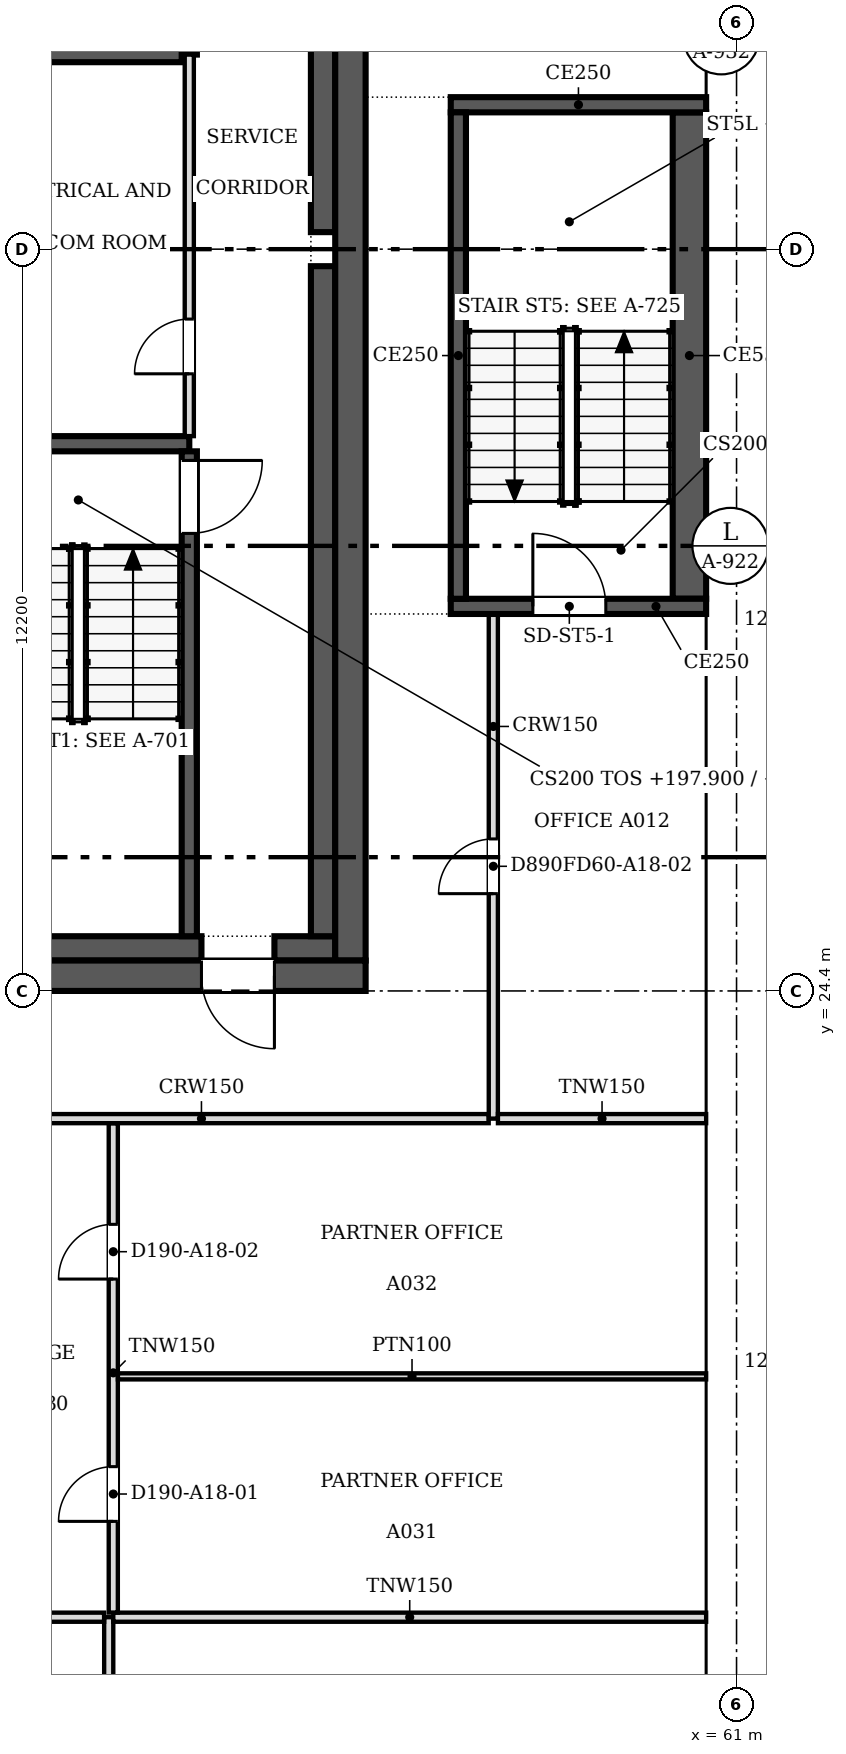
"""IFC4 building model, lengths in metres.
Left out: names, types, materials, properties, quantities, classifications, styles, units other than length and angle.
Written with IfcOpenShell. Run it as: python <this file> out.ifc"""

import sys

from ifc_helpers import new_model, si_unit, direction, frame, frame_2d, origin, place, context, subcontext, project, spatial, polyline, rectangle, outline, extrude, faceted_brep, source, transform, mapped, element, fill, save


model = new_model("IFC4")
c1 = context("Model", 3, precision=1e-05, world=origin(), true_north=direction((0.0, 1.0)))
c2 = subcontext(c1, "Body", "Model", "MODEL_VIEW")
j1 = project(units=[si_unit("LENGTHUNIT", "METRE"), si_unit("PLANEANGLEUNIT", "RADIAN")], contexts=[c1])
p1 = place(None, origin())
s1 = spatial("IfcSite", under=j1, at=p1, CompositionType="ELEMENT")
p2 = place(p1, origin())
s2 = spatial("IfcBuilding", under=s1, at=p2, CompositionType="ELEMENT")
p3 = place(p2, frame((0.0, 0.0, 197.9)))
s3 = spatial("IfcBuildingStorey", under=s2, at=p3, CompositionType="ELEMENT", Elevation=197.9)
m1 = source(origin(), c2, "Body", "SweptSolid", [
    extrude(outline(polyline([(6.1, 0.0), (3.05, 3.8), (0.0, 0.0), (6.1, 0.0)])), frame((0.0, 0.25, 0.0), z_axis=(0.0, -1.0, 0.0), x_axis=(1.0, 0.0, 0.0)), (0.0, 0.0, 1.0), 0.5),
])
p4 = place(p3, frame((60.75, 12.2, 0.0), z_axis=(0.0, 0.0, 1.0), x_axis=(0.0, 1.0, 0.0)))
e1 = element("IfcWall", 1, at=p4, inside=s3, PredefinedType="SOLIDWALL", context=c2, shape_type="MappedRepresentation", body=[
    mapped(m1, transform((0.0, 0.0, 0.0), scale=1.0)),
])
m2 = source(origin(), c2, "Body", "SweptSolid", [
    extrude(outline(polyline([(5.579, 0.25), (3.05, 3.401), (0.521, 0.25), (5.579, 0.25)])), frame((0.0, 0.26, 0.0), z_axis=(0.0, -1.0, 0.0), x_axis=(1.0, 0.0, 0.0)), (0.0, 0.0, 1.0), 0.52),
])
p5 = place(p4, origin())
e2 = element("IfcOpeningElement", 2, at=p5, cuts=e1, PredefinedType="OPENING", context=c2, shape_type="MappedRepresentation", body=[
    mapped(m2, transform((0.0, 0.0, 0.0), scale=1.0)),
])
m3 = source(origin(), c2, "Body", "Brep", [
    faceted_brep([(6.1, -0.25, 0.0), (3.05, -0.25, 3.8), (0.0, -0.25, 0.0), (6.1, -0.25, 0.0), (0.0, 0.25, 0.0), (3.05, 0.25, 3.8), (6.1, 0.25, 0.0), (6.1, 0.25, 0.0)], [[[0, 1, 2, 3]], [[4, 5, 6, 7]], [[6, 5, 1, 0]], [[5, 4, 2, 1]], [[4, 7, 3, 2]], [[3, 7, 6, 0]]]),
])
p6 = place(p3, frame((60.75, 18.3, 0.0), z_axis=(0.0, 0.0, 1.0), x_axis=(0.0, 1.0, 0.0)))
e3 = element("IfcWall", 3, at=p6, inside=s3, PredefinedType="SOLIDWALL", context=c2, shape_type="MappedRepresentation", body=[
    mapped(m3, transform((0.0, 0.0, 0.0), scale=1.0)),
])
p7 = place(p6, origin())
e4 = element("IfcOpeningElement", 4, at=p7, cuts=e3, PredefinedType="OPENING", context=c2, shape_type="MappedRepresentation", body=[
    mapped(m2, transform((0.0, 0.0, 0.0), scale=1.0)),
])
p8 = place(p3, frame((60.75, 24.4, 0.0), z_axis=(0.0, 0.0, 1.0), x_axis=(0.0, 1.0, 0.0)))
e5 = element("IfcWall", 5, at=p8, inside=s3, PredefinedType="SOLIDWALL", context=c2, shape_type="MappedRepresentation", body=[
    mapped(m1, transform((0.0, 0.0, 0.0), scale=1.0)),
])
p9 = place(p8, origin())
e6 = element("IfcOpeningElement", 6, at=p9, cuts=e5, PredefinedType="OPENING", context=c2, shape_type="MappedRepresentation", body=[
    mapped(m2, transform((0.0, 0.0, 0.0), scale=1.0)),
])
p10 = place(p3, frame((60.75, 30.5, 0.0), z_axis=(0.0, 0.0, 1.0), x_axis=(0.0, 1.0, 0.0)))
e7 = element("IfcWall", 7, at=p10, inside=s3, PredefinedType="SOLIDWALL", context=c2, shape_type="MappedRepresentation", body=[
    mapped(m1, transform((0.0, 0.0, 0.0), scale=1.0)),
])
p11 = place(p10, origin())
e8 = element("IfcOpeningElement", 8, at=p11, cuts=e7, PredefinedType="OPENING", context=c2, shape_type="MappedRepresentation", body=[
    mapped(m2, transform((0.0, 0.0, 0.0), scale=1.0)),
])
p12 = place(p3, frame((60.75, 36.6, 0.0), z_axis=(0.0, 0.0, 1.0), x_axis=(0.0, 1.0, 0.0)))
e9 = element("IfcWall", 9, at=p12, inside=s3, PredefinedType="SOLIDWALL", context=c2, shape_type="MappedRepresentation", body=[
    mapped(m3, transform((0.0, 0.0, 0.0), scale=1.0)),
])
p13 = place(p12, origin())
e10 = element("IfcOpeningElement", 10, at=p13, cuts=e9, PredefinedType="OPENING", context=c2, shape_type="MappedRepresentation", body=[
    mapped(m2, transform((0.0, 0.0, 0.0), scale=1.0)),
])
p14 = place(p2, frame((0.0, 0.0, 201.7)))
s4 = spatial("IfcBuildingStorey", under=s2, at=p14, CompositionType="ELEMENT", Elevation=201.7)
m4 = source(origin(), c2, "Body", "SweptSolid", [
    extrude(outline(polyline([(3.05, 0.0), (6.1, 3.8), (3.05, 7.6), (0.0, 3.8), (3.05, 0.0)])), frame((0.0, 0.25, 0.0), z_axis=(0.0, -1.0, 0.0), x_axis=(1.0, 0.0, 0.0)), (0.0, 0.0, 1.0), 0.5),
])
p15 = place(p14, frame((60.75, 9.15, -3.8), z_axis=(0.0, 0.0, 1.0), x_axis=(0.0, 1.0, 0.0)))
e11 = element("IfcWall", 11, at=p15, inside=s4, PredefinedType="SOLIDWALL", context=c2, shape_type="MappedRepresentation", body=[
    mapped(m4, transform((0.0, 0.0, 0.0), scale=1.0)),
])
m5 = source(origin(), c2, "Body", "SweptSolid", [
    extrude(outline(polyline([(3.05, 0.399), (5.78, 3.8), (3.05, 7.201), (0.321, 3.8), (3.05, 0.399)])), frame((0.0, 0.26, 0.0), z_axis=(0.0, -1.0, 0.0), x_axis=(1.0, 0.0, 0.0)), (0.0, 0.0, 1.0), 0.52),
])
p16 = place(p15, origin())
e12 = element("IfcOpeningElement", 12, at=p16, cuts=e11, PredefinedType="OPENING", context=c2, shape_type="MappedRepresentation", body=[
    mapped(m5, transform((0.0, 0.0, 0.0), scale=1.0)),
])
p17 = place(p14, frame((60.75, 15.25, -3.8), z_axis=(0.0, 0.0, 1.0), x_axis=(0.0, 1.0, 0.0)))
e13 = element("IfcWall", 13, at=p17, inside=s4, PredefinedType="SOLIDWALL", context=c2, shape_type="MappedRepresentation", body=[
    mapped(m4, transform((0.0, 0.0, 0.0), scale=1.0)),
])
p18 = place(p17, origin())
e14 = element("IfcOpeningElement", 14, at=p18, cuts=e13, PredefinedType="OPENING", context=c2, shape_type="MappedRepresentation", body=[
    mapped(m5, transform((0.0, 0.0, 0.0), scale=1.0)),
])
m6 = source(origin(), c2, "Body", "Brep", [
    faceted_brep([(3.05, -0.25, 0.0), (6.1, -0.25, 3.8), (6.1, -0.25, 3.8), (3.05, -0.25, 7.6), (0.0, -0.25, 3.8), (0.0, 0.25, 3.8), (3.05, 0.25, 7.6), (6.1, 0.25, 3.8), (6.1, 0.25, 3.8), (3.05, 0.25, 0.0)], [[[0, 1, 2, 3, 4]], [[5, 6, 7, 8, 9]], [[9, 8, 1, 0]], [[7, 6, 3, 2]], [[6, 5, 4, 3]], [[5, 9, 0, 4]], [[1, 8, 7, 2]]]),
])
p19 = place(p14, frame((60.75, 21.35, -3.8), z_axis=(0.0, 0.0, 1.0), x_axis=(0.0, 1.0, 0.0)))
e15 = element("IfcWall", 15, at=p19, inside=s4, PredefinedType="SOLIDWALL", context=c2, shape_type="MappedRepresentation", body=[
    mapped(m6, transform((0.0, 0.0, 0.0), scale=1.0)),
])
p20 = place(p19, origin())
e16 = element("IfcOpeningElement", 16, at=p20, cuts=e15, PredefinedType="OPENING", context=c2, shape_type="MappedRepresentation", body=[
    mapped(m5, transform((0.0, 0.0, 0.0), scale=1.0)),
])
p21 = place(p14, frame((60.75, 27.45, -3.8), z_axis=(0.0, 0.0, 1.0), x_axis=(0.0, 1.0, 0.0)))
e17 = element("IfcWall", 17, at=p21, inside=s4, PredefinedType="SOLIDWALL", context=c2, shape_type="MappedRepresentation", body=[
    mapped(m4, transform((0.0, 0.0, 0.0), scale=1.0)),
])
p22 = place(p21, origin())
e18 = element("IfcOpeningElement", 18, at=p22, cuts=e17, PredefinedType="OPENING", context=c2, shape_type="MappedRepresentation", body=[
    mapped(m5, transform((0.0, 0.0, 0.0), scale=1.0)),
])
p23 = place(p14, frame((60.75, 33.55, -3.8), z_axis=(0.0, 0.0, 1.0), x_axis=(0.0, 1.0, 0.0)))
e19 = element("IfcWall", 19, at=p23, inside=s4, PredefinedType="SOLIDWALL", context=c2, shape_type="MappedRepresentation", body=[
    mapped(m6, transform((0.0, 0.0, 0.0), scale=1.0)),
])
p24 = place(p23, origin())
e20 = element("IfcOpeningElement", 20, at=p24, cuts=e19, PredefinedType="OPENING", context=c2, shape_type="MappedRepresentation", body=[
    mapped(m5, transform((0.0, 0.0, 0.0), scale=1.0)),
])
p25 = place(p14, frame((60.75, 39.65, -3.8), z_axis=(0.0, 0.0, 1.0), x_axis=(0.0, 1.0, 0.0)))
e21 = element("IfcWall", 21, at=p25, inside=s4, PredefinedType="SOLIDWALL", context=c2, shape_type="MappedRepresentation", body=[
    mapped(m4, transform((0.0, 0.0, 0.0), scale=1.0)),
])
p26 = place(p25, origin())
e22 = element("IfcOpeningElement", 22, at=p26, cuts=e21, PredefinedType="OPENING", context=c2, shape_type="MappedRepresentation", body=[
    mapped(m5, transform((0.0, 0.0, 0.0), scale=1.0)),
])
p27 = place(p3, frame((54.9, 24.65, 0.0), z_axis=(0.0, 0.0, 1.0), x_axis=(-1.0, 0.0, 0.0)))
e23 = element("IfcWall", 23, at=p27, inside=s3, PredefinedType="SHEAR", context=c2, shape_type="SweptSolid", body=[
    extrude(rectangle(XDim=24.4, YDim=0.5, at=frame_2d((12.2, 0.0))), origin(), (0.0, 0.0, 1.0), 3.8),
])
m7 = source(origin(), c2, "Body", "SweptSolid", [
    extrude(rectangle(XDim=1.2, YDim=2.1, at=frame_2d((0.6, 1.05))), frame((0.0, 0.26, 0.0), z_axis=(0.0, -1.0, 0.0), x_axis=(1.0, 0.0, 0.0)), (0.0, 0.0, 1.0), 0.52),
])
p28 = place(p27, frame((1.5, 0.0, 0.0)))
e24 = element("IfcOpeningElement", 24, at=p28, cuts=e23, PredefinedType="OPENING", context=c2, shape_type="MappedRepresentation", body=[
    mapped(m7, transform((0.0, 0.0, 0.0), scale=1.0)),
])
p29 = place(p3, frame((54.65, 48.3, 0.0), z_axis=(0.0, 0.0, 1.0), x_axis=(0.0, -1.0, 0.0)))
e25 = element("IfcWall", 25, at=p29, inside=s3, PredefinedType="SHEAR", context=c2, shape_type="SweptSolid", body=[
    extrude(rectangle(XDim=23.4, YDim=0.5, at=frame_2d((11.7, 0.0))), origin(), (0.0, 0.0, 1.0), 3.8),
])
p30 = place(p29, frame((5.0, 0.0, 0.0)))
e26 = element("IfcOpeningElement", 26, at=p30, cuts=e25, PredefinedType="OPENING", context=c2, shape_type="MappedRepresentation", body=[
    mapped(m7, transform((0.0, 0.0, 0.0), scale=1.0)),
])
p31 = place(p3, frame((31.0, 25.1, 0.0), z_axis=(0.0, 0.0, 1.0), x_axis=(1.0, 0.0, 0.0)))
e27 = element("IfcWall", 27, at=p31, inside=s3, PredefinedType="SOLIDWALL", context=c2, shape_type="SweptSolid", body=[
    extrude(rectangle(XDim=21.2, YDim=0.4, at=frame_2d((10.6, 0.0))), origin(), (0.0, 0.0, 1.0), 3.8),
])
p32 = place(p3, frame((53.4, 25.1, 0.0), z_axis=(0.0, 0.0, 1.0), x_axis=(1.0, 0.0, 0.0)))
e28 = element("IfcWall", 28, at=p32, inside=s3, PredefinedType="SOLIDWALL", context=c2, shape_type="SweptSolid", body=[
    extrude(rectangle(XDim=1.0, YDim=0.4, at=frame_2d((0.5, 0.0))), origin(), (0.0, 0.0, 1.0), 3.8),
])
p33 = place(p3, frame((54.2, 25.3, 0.0), z_axis=(0.0, 0.0, 1.0), x_axis=(0.0, 1.0, 0.0)))
e29 = element("IfcWall", 29, at=p33, inside=s3, PredefinedType="SOLIDWALL", context=c2, shape_type="SweptSolid", body=[
    extrude(rectangle(XDim=11.02, YDim=0.4, at=frame_2d((5.51, 0.0))), origin(), (0.0, 0.0, 1.0), 3.8),
])
p34 = place(p3, frame((54.2, 36.88, 0.0), z_axis=(0.0, 0.0, 1.0), x_axis=(0.0, 1.0, 0.0)))
e30 = element("IfcWall", 30, at=p34, inside=s3, PredefinedType="SOLIDWALL", context=c2, shape_type="SweptSolid", body=[
    extrude(rectangle(XDim=5.22, YDim=0.4, at=frame_2d((2.61, 0.0))), origin(), (0.0, 0.0, 1.0), 3.8),
])
p35 = place(p3, frame((48.475, 33.4, 0.0), z_axis=(0.0, 0.0, 1.0), x_axis=(1.0, 0.0, 0.0)))
e31 = element("IfcWall", 31, at=p35, inside=s3, PredefinedType="SOLIDWALL", context=c2, shape_type="SweptSolid", body=[
    extrude(rectangle(XDim=3.525, YDim=0.25, at=frame_2d((1.762, 0.0))), origin(), (0.0, 0.0, 1.0), 3.8),
])
p36 = place(p3, frame((52.0, 25.3, 0.0), z_axis=(0.0, 0.0, 1.0), x_axis=(0.0, 1.0, 0.0)))
e32 = element("IfcWall", 32, at=p36, inside=s3, PredefinedType="SOLIDWALL", context=c2, shape_type="SweptSolid", body=[
    extrude(rectangle(XDim=7.975, YDim=0.25, at=frame_2d((3.987, 0.0))), origin(), (0.0, 0.0, 1.0), 3.8),
])
m8 = source(origin(), c2, "Body", "SweptSolid", [
    extrude(rectangle(XDim=1.2, YDim=2.1, at=frame_2d((0.6, 1.05))), frame((0.0, 0.135, 0.0), z_axis=(0.0, -1.0, 0.0), x_axis=(1.0, 0.0, 0.0)), (0.0, 0.0, 1.0), 0.27),
])
p37 = place(p36, frame((6.625, 0.0, 0.0)))
e33 = element("IfcOpeningElement", 33, at=p37, cuts=e32, PredefinedType="OPENING", context=c2, shape_type="MappedRepresentation", body=[
    mapped(m8, transform((0.0, 0.0, 0.0), scale=1.0)),
])
p38 = place(p3, frame((52.0, 39.8, 0.0), z_axis=(0.0, 0.0, 1.0), x_axis=(0.0, 1.0, 0.0)))
e34 = element("IfcWall", 34, at=p38, inside=s3, PredefinedType="SOLIDWALL", context=c2, shape_type="SweptSolid", body=[
    extrude(rectangle(XDim=8.1, YDim=0.25, at=frame_2d((4.05, 0.0))), origin(), (0.0, 0.0, 1.0), 3.8),
])
p39 = place(p38, frame((0.275, 0.0, 0.0)))
e35 = element("IfcOpeningElement", 35, at=p39, cuts=e34, PredefinedType="OPENING", context=c2, shape_type="MappedRepresentation", body=[
    mapped(m8, transform((0.0, 0.0, 0.0), scale=1.0)),
])
p40 = place(p3, frame((48.475, 39.8, 0.0), z_axis=(0.0, 0.0, 1.0), x_axis=(1.0, 0.0, 0.0)))
e36 = element("IfcWall", 36, at=p40, inside=s3, PredefinedType="SOLIDWALL", context=c2, shape_type="SweptSolid", body=[
    extrude(rectangle(XDim=3.4, YDim=0.25, at=frame_2d((1.7, 0.0))), origin(), (0.0, 0.0, 1.0), 3.8),
])
p41 = place(p3, frame((52.0, 33.525, 0.0), z_axis=(0.0, 0.0, 1.0), x_axis=(0.0, 1.0, 0.0)))
e37 = element("IfcWall", 37, at=p41, inside=s3, PredefinedType="PARTITIONING", context=c2, shape_type="SweptSolid", body=[
    extrude(rectangle(XDim=6.275, YDim=0.15, at=frame_2d((3.138, 0.0))), origin(), (0.0, 0.0, 1.0), 3.6),
])
m9 = source(origin(), c2, "Body", "SweptSolid", [
    extrude(rectangle(XDim=0.9, YDim=2.1, at=frame_2d((0.45, 1.05))), frame((0.0, 0.085, 0.0), z_axis=(0.0, -1.0, 0.0), x_axis=(1.0, 0.0, 0.0)), (0.0, 0.0, 1.0), 0.17),
])
p42 = place(p41, frame((1.025, 0.0, 0.0)))
e38 = element("IfcOpeningElement", 38, at=p42, cuts=e37, PredefinedType="OPENING", context=c2, shape_type="MappedRepresentation", body=[
    mapped(m9, transform((0.0, 0.0, 0.0), scale=1.0)),
])
p43 = place(p3, frame((60.5, 30.725, 0.0), z_axis=(0.0, 0.0, 1.0), x_axis=(-1.0, 0.0, 0.0)))
e39 = element("IfcWall", 39, at=p43, inside=s3, PredefinedType="SOLIDWALL", context=c2, shape_type="SweptSolid", body=[
    extrude(rectangle(XDim=4.2, YDim=0.25, at=frame_2d((2.1, 0.0))), origin(), (0.0, 0.0, 1.0), 3.8),
])
p44 = place(p43, frame((1.65, 0.0, 0.0)))
e40 = element("IfcOpeningElement", 40, at=p44, cuts=e39, PredefinedType="OPENING", context=c2, shape_type="MappedRepresentation", body=[
    mapped(m8, transform((0.0, 0.0, 0.0), scale=1.0)),
])
p45 = place(p3, frame((56.425, 30.85, 0.0), z_axis=(0.0, 0.0, 1.0), x_axis=(0.0, 1.0, 0.0)))
e41 = element("IfcWall", 41, at=p45, inside=s3, PredefinedType="SOLIDWALL", context=c2, shape_type="SweptSolid", body=[
    extrude(rectangle(XDim=8.0, YDim=0.25, at=frame_2d((4.0, 0.0))), origin(), (0.0, 0.0, 1.0), 3.8),
])
p46 = place(p3, frame((56.3, 38.975, 0.0), z_axis=(0.0, 0.0, 1.0), x_axis=(1.0, 0.0, 0.0)))
e42 = element("IfcWall", 42, at=p46, inside=s3, PredefinedType="SOLIDWALL", context=c2, shape_type="SweptSolid", body=[
    extrude(rectangle(XDim=4.2, YDim=0.25, at=frame_2d((2.1, 0.0))), origin(), (0.0, 0.0, 1.0), 3.8),
])
p47 = place(p3, frame((60.225, 38.85, 0.0), z_axis=(0.0, 0.0, 1.0), x_axis=(0.0, -1.0, 0.0)))
e43 = element("IfcWall", 43, at=p47, inside=s3, PredefinedType="SOLIDWALL", context=c2, shape_type="SweptSolid", body=[
    extrude(rectangle(XDim=8.0, YDim=0.55, at=frame_2d((4.0, 0.0))), origin(), (0.0, 0.0, 1.0), 3.8),
])
p48 = place(p3, frame((50.675, 14.1, 0.0), z_axis=(0.0, 0.0, 1.0), x_axis=(0.0, -1.0, 0.0)))
e44 = element("IfcWall", 44, at=p48, inside=s3, PredefinedType="PARTITIONING", context=c2, shape_type="SweptSolid", body=[
    extrude(rectangle(XDim=6.0, YDim=0.15, at=frame_2d((3.0, 0.0))), origin(), (0.0, 0.0, 1.0), 3.067),
])
p49 = place(p48, frame((2.6, 0.0, 0.0)))
e45 = element("IfcOpeningElement", 45, at=p49, cuts=e44, PredefinedType="OPENING", context=c2, shape_type="MappedRepresentation", body=[
    mapped(m9, transform((0.0, 0.0, 0.0), scale=1.0)),
])
p50 = place(p3, frame((47.476, 14.1, 0.0), z_axis=(0.0, 0.0, 1.0), x_axis=(1.0, 0.0, 0.0)))
e46 = element("IfcWall", 46, at=p50, inside=s3, PredefinedType="PARTITIONING", context=c2, shape_type="SweptSolid", body=[
    extrude(rectangle(XDim=3.123, YDim=0.15, at=frame_2d((1.562, 0.0))), origin(), (0.0, 0.0, 1.0), 3.067),
])
p51 = place(p3, frame((50.75, 14.1, 0.0), z_axis=(0.0, 0.0, 1.0), x_axis=(1.0, 0.0, 0.0)))
e47 = element("IfcWall", 47, at=p51, inside=s3, PredefinedType="PARTITIONING", context=c2, shape_type="SweptSolid", body=[
    extrude(rectangle(XDim=9.75, YDim=0.15, at=frame_2d((4.875, 0.0))), origin(), (0.0, 0.0, 1.0), 3.067),
])
p52 = place(p3, frame((50.75, 22.224, 0.0), z_axis=(0.0, 0.0, 1.0), x_axis=(0.0, -1.0, 0.0)))
e48 = element("IfcWall", 48, at=p52, inside=s3, PredefinedType="PARTITIONING", context=c2, shape_type="SweptSolid", body=[
    extrude(rectangle(XDim=8.048, YDim=0.15, at=frame_2d((4.024, 0.0))), origin(), (0.0, 0.0, 1.0), 3.067),
])
p53 = place(p52, frame((5.648, 0.0, 0.0)))
e49 = element("IfcOpeningElement", 49, at=p53, cuts=e48, PredefinedType="OPENING", context=c2, shape_type="MappedRepresentation", body=[
    mapped(m9, transform((0.0, 0.0, 0.0), scale=1.0)),
])
p54 = place(p52, frame((1.663, 0.0, 0.0)))
e50 = element("IfcOpeningElement", 50, at=p54, cuts=e48, PredefinedType="OPENING", context=c2, shape_type="MappedRepresentation", body=[
    mapped(m9, transform((0.0, 0.0, 0.0), scale=1.0)),
])
p55 = place(p3, frame((50.826, 18.061, 0.0), z_axis=(0.0, 0.0, 1.0), x_axis=(1.0, 0.0, 0.0)))
e51 = element("IfcWall", 51, at=p55, inside=s3, PredefinedType="PARTITIONING", context=c2, shape_type="SweptSolid", body=[
    extrude(rectangle(XDim=9.674, YDim=0.1, at=frame_2d((4.837, 0.0))), origin(), (0.0, 0.0, 1.0), 3.067),
])
p56 = place(p3, frame((47.476, 22.3, 0.0), z_axis=(0.0, 0.0, 1.0), x_axis=(1.0, 0.0, 0.0)))
e52 = element("IfcWall", 52, at=p56, inside=s3, PredefinedType="PARTITIONING", context=c2, shape_type="SweptSolid", body=[
    extrude(rectangle(XDim=9.448, YDim=0.15, at=frame_2d((4.724, 0.0))), origin(), (0.0, 0.0, 1.0), 3.067),
])
p57 = place(p3, frame((57.0, 30.6, 0.0), z_axis=(0.0, 0.0, 1.0), x_axis=(0.0, -1.0, 0.0)))
e53 = element("IfcWall", 53, at=p57, inside=s3, PredefinedType="PARTITIONING", context=c2, shape_type="SweptSolid", body=[
    extrude(rectangle(XDim=8.3, YDim=0.15, at=frame_2d((4.15, 0.0))), origin(), (0.0, 0.0, 1.0), 3.067),
])
p58 = place(p57, frame((3.7, 0.0, 0.0)))
e54 = element("IfcOpeningElement", 54, at=p58, cuts=e53, PredefinedType="OPENING", context=c2, shape_type="MappedRepresentation", body=[
    mapped(m9, transform((0.0, 0.0, 0.0), scale=1.0)),
])
p59 = place(p3, frame((57.076, 22.3, 0.0), z_axis=(0.0, 0.0, 1.0), x_axis=(1.0, 0.0, 0.0)))
e55 = element("IfcWall", 55, at=p59, inside=s3, PredefinedType="PARTITIONING", context=c2, shape_type="SweptSolid", body=[
    extrude(rectangle(XDim=3.424, YDim=0.15, at=frame_2d((1.712, 0.0))), origin(), (0.0, 0.0, 1.0), 3.067),
])
m10 = source(origin(), c2, "Body", "SweptSolid", [
    extrude(rectangle(XDim=1.2, YDim=2.1, at=frame_2d((0.6, 1.05))), frame((0.0, 0.025, 0.0), z_axis=(0.0, -1.0, 0.0), x_axis=(1.0, 0.0, 0.0)), (0.0, 0.0, 1.0), 0.05),
])
p60 = place(p28, origin())
e56 = element("IfcDoor", 56, at=p60, inside=s3, OperationType="SINGLE_SWING_LEFT", PredefinedType="DOOR", context=c2, shape_type="MappedRepresentation", body=[
    mapped(m10, transform((0.0, 0.0, 0.0), scale=1.0)),
])
fill(e24, e56)
p61 = place(p37, origin())
e57 = element("IfcDoor", 57, at=p61, inside=s3, OperationType="SINGLE_SWING_RIGHT", PredefinedType="DOOR", context=c2, shape_type="MappedRepresentation", body=[
    mapped(m10, transform((0.0, 0.0, 0.0), scale=1.0)),
])
fill(e33, e57)
m11 = source(origin(), c2, "Body", "SweptSolid", [
    extrude(rectangle(XDim=0.9, YDim=2.1, at=frame_2d((0.45, 1.05))), frame((0.0, 0.025, 0.0), z_axis=(0.0, -1.0, 0.0), x_axis=(1.0, 0.0, 0.0)), (0.0, 0.0, 1.0), 0.05),
])
p62 = place(p42, origin())
e58 = element("IfcDoor", 58, at=p62, inside=s3, OperationType="SINGLE_SWING_LEFT", PredefinedType="DOOR", context=c2, shape_type="MappedRepresentation", body=[
    mapped(m11, transform((0.0, 0.0, 0.0), scale=1.0)),
])
fill(e38, e58)
p63 = place(p44, origin())
e59 = element("IfcDoor", 59, at=p63, inside=s3, OperationType="SINGLE_SWING_RIGHT", PredefinedType="DOOR", context=c2, shape_type="MappedRepresentation", body=[
    mapped(m10, transform((0.0, 0.0, 0.0), scale=1.0)),
])
fill(e40, e59)
p64 = place(p53, origin())
e60 = element("IfcDoor", 60, at=p64, inside=s3, OperationType="SINGLE_SWING_RIGHT", PredefinedType="DOOR", context=c2, shape_type="MappedRepresentation", body=[
    mapped(m11, transform((0.0, 0.0, 0.0), scale=1.0)),
])
fill(e49, e60)
p65 = place(p54, origin())
e61 = element("IfcDoor", 61, at=p65, inside=s3, OperationType="SINGLE_SWING_RIGHT", PredefinedType="DOOR", context=c2, shape_type="MappedRepresentation", body=[
    mapped(m11, transform((0.0, 0.0, 0.0), scale=1.0)),
])
fill(e50, e61)
p66 = place(p58, origin())
e62 = element("IfcDoor", 62, at=p66, inside=s3, OperationType="SINGLE_SWING_RIGHT", PredefinedType="DOOR", context=c2, shape_type="MappedRepresentation", body=[
    mapped(m11, transform((0.0, 0.0, 0.0), scale=1.0)),
])
fill(e54, e62)
save(model, sys.argv[1])
